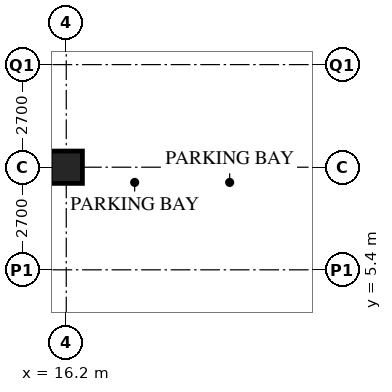
"""IFC4 building model, lengths in metres.
Left out: names, types, materials, properties, quantities, classifications, styles, units other than length and angle.
Written with IfcOpenShell. Run it as: python <this file> out.ifc"""

import sys

from ifc_helpers import new_model, si_unit, direction, frame, origin, origin_2d, place, context, subcontext, project, spatial, hollow_rectangle, extrude, element, save


model = new_model("IFC4")
c1 = context("Model", 3, precision=1e-05, world=origin(), true_north=direction((0.0, 1.0)))
c2 = subcontext(c1, "Body", "Model", "MODEL_VIEW")
j1 = project(units=[si_unit("LENGTHUNIT", "METRE"), si_unit("PLANEANGLEUNIT", "RADIAN")], contexts=[c1])
p1 = place(None, origin())
s1 = spatial("IfcSite", under=j1, at=p1, CompositionType="ELEMENT")
p2 = place(p1, origin())
s2 = spatial("IfcBuilding", under=s1, at=p2, CompositionType="ELEMENT")
p3 = place(p2, frame((0.0, 0.0, -4.2)))
s3 = spatial("IfcBuildingStorey", under=s2, at=p3, CompositionType="ELEMENT", Elevation=-4.2)
p4 = place(p3, frame((16.2, 8.1, 0.0), z_axis=(0.0, 0.0, 1.0), x_axis=(1.0, 0.0, 0.0)))
e1 = element("IfcColumn", 1, at=p4, inside=s3, PredefinedType="COLUMN", context=c2, shape_type="SweptSolid", body=[
    extrude(hollow_rectangle(XDim=0.85, YDim=0.85, WallThickness=0.085, at=origin_2d()), origin(), (0.0, 0.0, 1.0), 4.2),
])
save(model, sys.argv[1])
